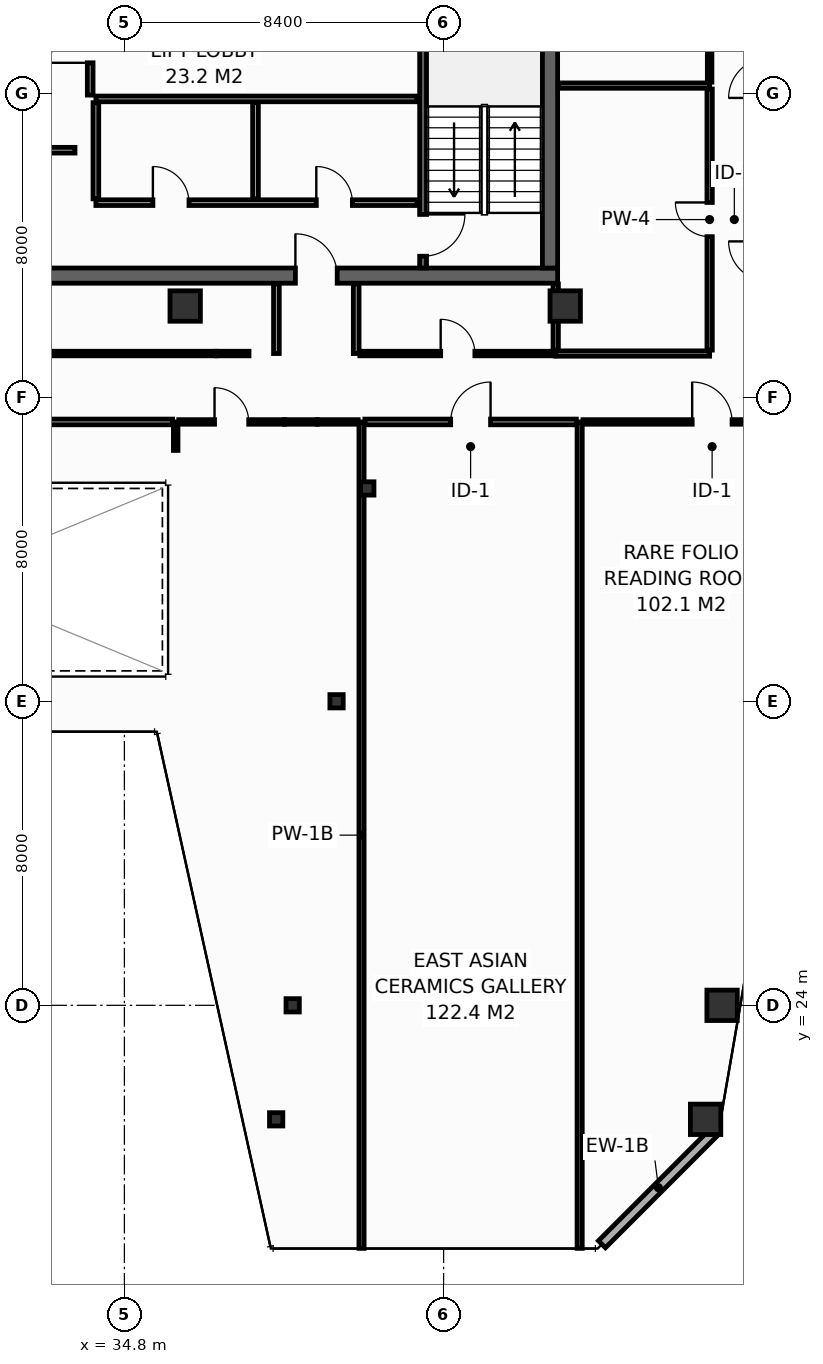
"""IFC4 building model, lengths in metres.
Left out: names, types, materials, properties, quantities, classifications, styles, units other than length and angle.
Written with IfcOpenShell. Run it as: python <this file> out.ifc"""

import sys

from ifc_helpers import new_model, si_unit, direction, frame, frame_2d, origin, origin_2d, place, context, subcontext, project, spatial, rectangle, hollow_rectangle, extrude, element, fill, save


model = new_model("IFC4")
c1 = context("Model", 3, precision=1e-05, world=origin(), true_north=direction((0.0, 1.0)))
c2 = subcontext(c1, "Body", "Model", "MODEL_VIEW")
j1 = project(units=[si_unit("LENGTHUNIT", "METRE"), si_unit("PLANEANGLEUNIT", "RADIAN")], contexts=[c1])
p1 = place(None, origin())
s1 = spatial("IfcSite", under=j1, at=p1, CompositionType="ELEMENT")
p2 = place(p1, origin())
s2 = spatial("IfcBuilding", under=s1, at=p2, CompositionType="ELEMENT")
p3 = place(p2, frame((0.0, 0.0, 249.6)))
s3 = spatial("IfcBuildingStorey", under=s2, at=p3, CompositionType="ELEMENT", Elevation=249.6)
p4 = place(p3, frame((13.7, 43.2, 0.0), z_axis=(0.0, 0.0, 1.0), x_axis=(1.0, 0.0, 0.0)))
e1 = element("IfcWall", 1, at=p4, inside=s3, PredefinedType="SHEAR", context=c2, shape_type="SweptSolid", body=[
    extrude(rectangle(XDim=32.5, YDim=0.4, at=frame_2d((16.25, 0.0))), origin(), (0.0, 0.0, 1.0), 3.35),
])
p5 = place(p4, frame((5.4, 0.0, 0.0)))
e2 = element("IfcOpeningElement", 2, at=p5, cuts=e1, PredefinedType="OPENING", context=c2, shape_type="SweptSolid", body=[
    extrude(rectangle(XDim=1.1, YDim=2.15, at=frame_2d((0.55, 1.075))), frame((0.0, 0.21, 0.0), z_axis=(0.0, -1.0, 0.0), x_axis=(1.0, 0.0, 0.0)), (0.0, 0.0, 1.0), 0.42),
])
p6 = place(p4, frame((25.6, 0.0, 0.0)))
e3 = element("IfcOpeningElement", 3, at=p6, cuts=e1, PredefinedType="OPENING", context=c2, shape_type="SweptSolid", body=[
    extrude(rectangle(XDim=1.1, YDim=2.15, at=frame_2d((0.55, 1.075))), frame((0.0, 0.21, 0.0), z_axis=(0.0, -1.0, 0.0), x_axis=(1.0, 0.0, 0.0)), (0.0, 0.0, 1.0), 0.42),
])
p7 = place(p3, frame((46.0, 43.4, 0.0), z_axis=(0.0, 0.0, 1.0), x_axis=(0.0, 1.0, 0.0)))
e4 = element("IfcWall", 4, at=p7, inside=s3, PredefinedType="SHEAR", context=c2, shape_type="SweptSolid", body=[
    extrude(rectangle(XDim=10.4, YDim=0.4, at=frame_2d((5.2, 0.0))), origin(), (0.0, 0.0, 1.0), 3.35),
])
for number, where, z_axis, x_axis in (
    (5, (36.4, 42.4, 0.0), (0.0, 0.0, 1.0), (1.0, 0.0, 0.0)),
    (6, (46.4, 42.4, 0.0), (0.0, 0.0, 1.0), (1.0, 0.0, 0.0)),
    (7, (50.094, 21.0, 0.0), (0.0, 0.0, 1.0), (1.0, 0.0, 0.0)),
):
    element("IfcColumn", number, at=place(p3, frame(where, z_axis=z_axis, x_axis=x_axis)), inside=s3, PredefinedType="COLUMN", context=c2, shape_type="SweptSolid", body=[
        extrude(hollow_rectangle(XDim=0.8, YDim=0.8, WallThickness=0.036, at=origin_2d()), origin(), (0.0, 0.0, 1.0), 3.8),
    ])
p8 = place(p3, frame((38.794, 21.0, 0.0), z_axis=(0.0, 0.0, 1.0), x_axis=(1.0, 0.0, 0.0)))
e8 = element("IfcColumn", 8, at=p8, inside=s3, PredefinedType="COLUMN", context=c2, shape_type="SweptSolid", body=[
    extrude(hollow_rectangle(XDim=0.35, YDim=0.35, WallThickness=0.016, at=origin_2d()), origin(), (0.0, 0.0, 1.0), 3.8),
])
p9 = place(p3, frame((50.528, 24.0, 0.0), z_axis=(0.0, 0.0, 1.0), x_axis=(1.0, 0.0, 0.0)))
e9 = element("IfcColumn", 9, at=p9, inside=s3, PredefinedType="COLUMN", context=c2, shape_type="SweptSolid", body=[
    extrude(hollow_rectangle(XDim=0.8, YDim=0.8, WallThickness=0.036, at=origin_2d()), origin(), (0.0, 0.0, 1.0), 3.8),
])
for number, where, z_axis, x_axis in (
    (10, (39.228, 24.0, 0.0), (0.0, 0.0, 1.0), (1.0, 0.0, 0.0)),
    (11, (40.383, 32.0, 0.0), (0.0, 0.0, 1.0), (1.0, 0.0, 0.0)),
    (12, (41.192, 37.6, 0.0), (0.0, 0.0, 1.0), (1.0, 0.0, 0.0)),
):
    element("IfcColumn", number, at=place(p3, frame(where, z_axis=z_axis, x_axis=x_axis)), inside=s3, PredefinedType="COLUMN", context=c2, shape_type="SweptSolid", body=[
        extrude(hollow_rectangle(XDim=0.35, YDim=0.35, WallThickness=0.016, at=origin_2d()), origin(), (0.0, 0.0, 1.0), 3.8),
    ])
p10 = place(p3, frame((42.66, 53.8, 0.0), z_axis=(0.0, 0.0, 1.0), x_axis=(0.0, -1.0, 0.0)))
e13 = element("IfcWall", 13, at=p10, inside=s3, PredefinedType="SHEAR", context=c2, shape_type="SweptSolid", body=[
    extrude(rectangle(XDim=10.4, YDim=0.18, at=frame_2d((5.2, 0.0))), origin(), (0.0, 0.0, 1.0), 3.35),
])
p11 = place(p10, frame((8.99, 0.0, 0.0)))
e14 = element("IfcOpeningElement", 14, at=p11, cuts=e13, PredefinedType="OPENING", context=c2, shape_type="SweptSolid", body=[
    extrude(rectangle(XDim=1.1, YDim=2.15, at=frame_2d((0.55, 1.075))), frame((0.0, 0.1, 0.0), z_axis=(0.0, -1.0, 0.0), x_axis=(1.0, 0.0, 0.0)), (0.0, 0.0, 1.0), 0.2),
])
p12 = place(p3, frame((33.9, 47.95, 0.0), z_axis=(0.0, 0.0, 1.0), x_axis=(0.0, 1.0, 0.0)))
e15 = element("IfcWall", 15, at=p12, inside=s3, PredefinedType="PARTITIONING", context=c2, shape_type="SweptSolid", body=[
    extrude(rectangle(XDim=2.75, YDim=0.15, at=frame_2d((1.375, 0.0))), origin(), (0.0, 0.0, 1.0), 3.35),
])
p13 = place(p12, frame((0.85, 0.0, 0.0)))
e16 = element("IfcOpeningElement", 16, at=p13, cuts=e15, PredefinedType="OPENING", context=c2, shape_type="SweptSolid", body=[
    extrude(rectangle(XDim=1.05, YDim=2.15, at=frame_2d((0.525, 1.075))), frame((0.0, 0.085, 0.0), z_axis=(0.0, -1.0, 0.0), x_axis=(1.0, 0.0, 0.0)), (0.0, 0.0, 1.0), 0.17),
])
p14 = place(p3, frame((34.05, 45.12, 0.0), z_axis=(0.0, 0.0, 1.0), x_axis=(1.0, 0.0, 0.0)))
e17 = element("IfcWall", 17, at=p14, inside=s3, PredefinedType="PARTITIONING", context=c2, shape_type="SweptSolid", body=[
    extrude(rectangle(XDim=8.45, YDim=0.15, at=frame_2d((4.225, 0.0))), origin(), (0.0, 0.0, 1.0), 3.35),
])
p15 = place(p14, frame((1.5, 0.0, 0.0)))
e18 = element("IfcOpeningElement", 18, at=p15, cuts=e17, PredefinedType="OPENING", context=c2, shape_type="SweptSolid", body=[
    extrude(rectangle(XDim=0.95, YDim=2.15, at=frame_2d((0.475, 1.075))), frame((0.0, 0.085, 0.0), z_axis=(0.0, -1.0, 0.0), x_axis=(1.0, 0.0, 0.0)), (0.0, 0.0, 1.0), 0.17),
])
p16 = place(p14, frame((5.8, 0.0, 0.0)))
e19 = element("IfcOpeningElement", 19, at=p16, cuts=e17, PredefinedType="OPENING", context=c2, shape_type="SweptSolid", body=[
    extrude(rectangle(XDim=0.95, YDim=2.15, at=frame_2d((0.475, 1.075))), frame((0.0, 0.085, 0.0), z_axis=(0.0, -1.0, 0.0), x_axis=(1.0, 0.0, 0.0)), (0.0, 0.0, 1.0), 0.17),
])
p17 = place(p3, frame((34.05, 47.85, 0.0), z_axis=(0.0, 0.0, 1.0), x_axis=(1.0, 0.0, 0.0)))
e20 = element("IfcWall", 20, at=p17, inside=s3, PredefinedType="PARTITIONING", context=c2, shape_type="SweptSolid", body=[
    extrude(rectangle(XDim=8.45, YDim=0.15, at=frame_2d((4.225, 0.0))), origin(), (0.0, 0.0, 1.0), 3.35),
])
for number, where, z_axis, x_axis in (
    (21, (38.25, 45.22, 0.0), (0.0, 0.0, 1.0), (0.0, 1.0, 0.0)),
    (22, (34.05, 45.22, 0.0), (0.0, 0.0, 1.0), (0.0, 1.0, 0.0)),
):
    element("IfcWall", number, at=place(p3, frame(where, z_axis=z_axis, x_axis=x_axis)), inside=s3, PredefinedType="PARTITIONING", context=c2, shape_type="SweptSolid", body=[
        extrude(rectangle(XDim=2.53, YDim=0.15, at=frame_2d((1.265, 0.0))), origin(), (0.0, 0.0, 1.0), 3.35),
    ])
p18 = place(p3, frame((25.85, 46.5, 0.0), z_axis=(0.0, 0.0, 1.0), x_axis=(1.0, 0.0, 0.0)))
e23 = element("IfcWall", 23, at=p18, inside=s3, PredefinedType="PARTITIONING", context=c2, shape_type="SweptSolid", body=[
    extrude(rectangle(XDim=7.65, YDim=0.15, at=frame_2d((3.825, 0.0))), origin(), (0.0, 0.0, 1.0), 3.35),
])
p19 = place(p18, frame((2.8, 0.0, 0.0)))
e24 = element("IfcOpeningElement", 24, at=p19, cuts=e23, PredefinedType="OPENING", context=c2, shape_type="SweptSolid", body=[
    extrude(rectangle(XDim=0.95, YDim=2.15, at=frame_2d((0.475, 1.075))), frame((0.0, 0.085, 0.0), z_axis=(0.0, -1.0, 0.0), x_axis=(1.0, 0.0, 0.0)), (0.0, 0.0, 1.0), 0.17),
])
p20 = place(p3, frame((47.366, 17.713, 0.0), z_axis=(0.0, 0.0, 1.0), x_axis=(0.70707775441, 0.707135806771, 0.0)))
e25 = element("IfcWall", 25, at=p20, inside=s3, PredefinedType="STANDARD", context=c2, shape_type="SweptSolid", body=[
    extrude(rectangle(XDim=4.206, YDim=0.26, at=frame_2d((2.103, 0.0))), origin(), (0.0, 0.0, 1.0), 3.35),
])
p21 = place(p3, frame((46.15, 41.15, 0.0), z_axis=(0.0, 0.0, 1.0), x_axis=(1.0, 0.0, 0.0)))
e26 = element("IfcWall", 26, at=p21, inside=s3, PredefinedType="PARTITIONING", context=c2, shape_type="SweptSolid", body=[
    extrude(rectangle(XDim=4.05, YDim=0.14, at=frame_2d((2.025, 0.0))), origin(), (0.0, 0.0, 1.0), 3.35),
])
p22 = place(p3, frame((46.15, 41.24, 0.0), z_axis=(0.0, 0.0, 1.0), x_axis=(0.0, 1.0, 0.0)))
e27 = element("IfcWall", 27, at=p22, inside=s3, PredefinedType="PARTITIONING", context=c2, shape_type="SweptSolid", body=[
    extrude(rectangle(XDim=1.74, YDim=0.14, at=frame_2d((0.87, 0.0))), origin(), (0.0, 0.0, 1.0), 3.35),
])
p23 = place(p3, frame((46.22, 48.2, 0.0), z_axis=(0.0, 0.0, 1.0), x_axis=(1.0, 0.0, 0.0)))
e28 = element("IfcWall", 28, at=p23, inside=s3, PredefinedType="PARTITIONING", context=c2, shape_type="SweptSolid", body=[
    extrude(rectangle(XDim=3.98, YDim=0.14, at=frame_2d((1.99, 0.0))), origin(), (0.0, 0.0, 1.0), 3.35),
])
p24 = place(p3, frame((50.2, 41.24, 0.0), z_axis=(0.0, 0.0, 1.0), x_axis=(0.0, 1.0, 0.0)))
e29 = element("IfcWall", 29, at=p24, inside=s3, PredefinedType="PARTITIONING", context=c2, shape_type="SweptSolid", body=[
    extrude(rectangle(XDim=6.87, YDim=0.14, at=frame_2d((3.435, 0.0))), origin(), (0.0, 0.0, 1.0), 2.747),
])
p25 = place(p24, frame((2.985, 0.0, 0.0)))
e30 = element("IfcOpeningElement", 30, at=p25, cuts=e29, PredefinedType="OPENING", context=c2, shape_type="SweptSolid", body=[
    extrude(rectangle(XDim=0.9, YDim=2.1, at=frame_2d((0.45, 1.05))), frame((0.0, 0.08, 0.0), z_axis=(0.0, -1.0, 0.0), x_axis=(1.0, 0.0, 0.0)), (0.0, 0.0, 1.0), 0.16),
])
p26 = place(p3, frame((50.2, 48.29, 0.0), z_axis=(0.0, 0.0, 1.0), x_axis=(0.0, 1.0, 0.0)))
e31 = element("IfcWall", 31, at=p26, inside=s3, PredefinedType="PARTITIONING", context=c2, shape_type="SweptSolid", body=[
    extrude(rectangle(XDim=3.98, YDim=0.12, at=frame_2d((1.99, 0.0))), origin(), (0.0, 0.0, 1.0), 3.35),
])
p27 = place(p26, frame((1.54, 0.0, 0.0)))
e32 = element("IfcOpeningElement", 32, at=p27, cuts=e31, PredefinedType="OPENING", context=c2, shape_type="SweptSolid", body=[
    extrude(rectangle(XDim=0.9, YDim=2.1, at=frame_2d((0.45, 1.05))), frame((0.0, 0.07, 0.0), z_axis=(0.0, -1.0, 0.0), x_axis=(1.0, 0.0, 0.0)), (0.0, 0.0, 1.0), 0.14),
])
for number, where, z_axis, x_axis in (
    (33, (38.8, 41.15, 0.0), (0.0, 0.0, 1.0), (0.0, 1.0, 0.0)),
    (34, (40.9, 41.15, 0.0), (0.0, 0.0, 1.0), (0.0, 1.0, 0.0)),
):
    element("IfcWall", number, at=place(p3, frame(where, z_axis=z_axis, x_axis=x_axis)), inside=s3, PredefinedType="PARTITIONING", context=c2, shape_type="SweptSolid", body=[
        extrude(rectangle(XDim=1.83, YDim=0.15, at=frame_2d((0.915, 0.0))), origin(), (0.0, 0.0, 1.0), 3.35),
    ])
p28 = place(p3, frame((22.783, 41.15, 0.0), z_axis=(0.0, 0.0, 1.0), x_axis=(1.0, 0.0, 0.0)))
e35 = element("IfcWall", 35, at=p28, inside=s3, PredefinedType="PARTITIONING", context=c2, shape_type="SweptSolid", body=[
    extrude(rectangle(XDim=14.434, YDim=0.12, at=frame_2d((7.217, 0.0))), origin(), (0.0, 0.0, 1.0), 3.35),
])
p29 = place(p28, frame((6.767, 0.0, 0.0)))
e36 = element("IfcOpeningElement", 36, at=p29, cuts=e35, PredefinedType="OPENING", context=c2, shape_type="SweptSolid", body=[
    extrude(rectangle(XDim=0.9, YDim=2.1, at=frame_2d((0.45, 1.05))), frame((0.0, 0.07, 0.0), z_axis=(0.0, -1.0, 0.0), x_axis=(1.0, 0.0, 0.0)), (0.0, 0.0, 1.0), 0.14),
])
p30 = place(p3, frame((37.217, 41.15, 0.0), z_axis=(0.0, 0.0, 1.0), x_axis=(1.0, 0.0, 0.0)))
e37 = element("IfcWall", 37, at=p30, inside=s3, PredefinedType="PARTITIONING", context=c2, shape_type="SweptSolid", body=[
    extrude(rectangle(XDim=0.862, YDim=0.12, at=frame_2d((0.431, 0.0))), origin(), (0.0, 0.0, 1.0), 1.935),
])
p31 = place(p3, frame((40.995, 41.15, 0.0), z_axis=(0.0, 0.0, 1.0), x_axis=(1.0, 0.0, 0.0)))
e38 = element("IfcWall", 38, at=p31, inside=s3, PredefinedType="PARTITIONING", context=c2, shape_type="SweptSolid", body=[
    extrude(rectangle(XDim=5.155, YDim=0.12, at=frame_2d((2.577, 0.0))), origin(), (0.0, 0.0, 1.0), 3.35),
])
p32 = place(p31, frame((2.128, 0.0, 0.0)))
e39 = element("IfcOpeningElement", 39, at=p32, cuts=e38, PredefinedType="OPENING", context=c2, shape_type="SweptSolid", body=[
    extrude(rectangle(XDim=0.9, YDim=2.1, at=frame_2d((0.45, 1.05))), frame((0.0, 0.07, 0.0), z_axis=(0.0, -1.0, 0.0), x_axis=(1.0, 0.0, 0.0)), (0.0, 0.0, 1.0), 0.14),
])
for number, where, z_axis, x_axis in (
    (40, (41.04, 17.605, 0.0), (0.0, 0.0, 1.0), (0.0, 1.0, 0.0)),
    (41, (46.78, 17.605, 0.0), (0.0, 0.0, 1.0), (0.0, 1.0, 0.0)),
):
    element("IfcWall", number, at=place(p3, frame(where, z_axis=z_axis, x_axis=x_axis)), inside=s3, PredefinedType="PARTITIONING", context=c2, shape_type="SweptSolid", body=[
        extrude(rectangle(XDim=21.745, YDim=0.135, at=frame_2d((10.873, 0.0))), origin(), (0.0, 0.0, 1.0), 1.535),
    ])
p33 = place(p3, frame((36.15, 38.6, 0.0), z_axis=(0.0, 0.0, 1.0), x_axis=(0.0, 1.0, 0.0)))
e42 = element("IfcWall", 42, at=p33, inside=s3, PredefinedType="PARTITIONING", context=c2, shape_type="SweptSolid", body=[
    extrude(rectangle(XDim=0.75, YDim=0.12, at=frame_2d((0.375, 0.0))), origin(), (0.0, 0.0, 1.0), 3.35),
])
p34 = place(p3, frame((23.93, 39.35, 0.0), z_axis=(0.0, 0.0, 1.0), x_axis=(1.0, 0.0, 0.0)))
e43 = element("IfcWall", 43, at=p34, inside=s3, PredefinedType="PARTITIONING", context=c2, shape_type="SweptSolid", body=[
    extrude(rectangle(XDim=12.14, YDim=0.15, at=frame_2d((6.07, 0.0))), origin(), (0.0, 0.0, 1.0), 3.35),
])
p35 = place(p3, frame((36.23, 39.35, 0.0), z_axis=(0.0, 0.0, 1.0), x_axis=(1.0, 0.0, 0.0)))
e44 = element("IfcWall", 44, at=p35, inside=s3, PredefinedType="PARTITIONING", context=c2, shape_type="SweptSolid", body=[
    extrude(rectangle(XDim=2.784, YDim=0.12, at=frame_2d((1.392, 0.0))), origin(), (0.0, 0.0, 1.0), 3.35),
])
p36 = place(p35, frame((0.942, 0.0, 0.0)))
e45 = element("IfcOpeningElement", 45, at=p36, cuts=e44, PredefinedType="OPENING", context=c2, shape_type="SweptSolid", body=[
    extrude(rectangle(XDim=0.9, YDim=2.1, at=frame_2d((0.45, 1.05))), frame((0.0, 0.07, 0.0), z_axis=(0.0, -1.0, 0.0), x_axis=(1.0, 0.0, 0.0)), (0.0, 0.0, 1.0), 0.14),
])
p37 = place(p3, frame((39.876, 39.35, 0.0), z_axis=(0.0, 0.0, 1.0), x_axis=(1.0, 0.0, 0.0)))
e46 = element("IfcWall", 46, at=p37, inside=s3, PredefinedType="PARTITIONING", context=c2, shape_type="SweptSolid", body=[
    extrude(rectangle(XDim=1.076, YDim=0.12, at=frame_2d((0.538, 0.0))), origin(), (0.0, 0.0, 1.0), 3.35),
])
p38 = place(p3, frame((39.014, 39.35, 0.0), z_axis=(0.0, 0.0, 1.0), x_axis=(1.0, 0.0, 0.0)))
e47 = element("IfcWall", 47, at=p38, inside=s3, PredefinedType="PARTITIONING", context=c2, shape_type="SweptSolid", body=[
    extrude(rectangle(XDim=0.862, YDim=0.12, at=frame_2d((0.431, 0.0))), origin(), (0.0, 0.0, 1.0), 1.935),
])
p39 = place(p3, frame((41.127, 39.35, 0.0), z_axis=(0.0, 0.0, 1.0), x_axis=(1.0, 0.0, 0.0)))
e48 = element("IfcWall", 48, at=p39, inside=s3, PredefinedType="PARTITIONING", context=c2, shape_type="SweptSolid", body=[
    extrude(rectangle(XDim=5.565, YDim=0.15, at=frame_2d((2.782, 0.0))), origin(), (0.0, 0.0, 1.0), 3.35),
])
p40 = place(p39, frame((2.258, 0.0, 0.0)))
e49 = element("IfcOpeningElement", 49, at=p40, cuts=e48, PredefinedType="OPENING", context=c2, shape_type="SweptSolid", body=[
    extrude(rectangle(XDim=1.05, YDim=2.15, at=frame_2d((0.525, 1.075))), frame((0.0, 0.085, 0.0), z_axis=(0.0, -1.0, 0.0), x_axis=(1.0, 0.0, 0.0)), (0.0, 0.0, 1.0), 0.17),
])
p41 = place(p3, frame((46.867, 39.35, 0.0), z_axis=(0.0, 0.0, 1.0), x_axis=(1.0, 0.0, 0.0)))
e50 = element("IfcWall", 50, at=p41, inside=s3, PredefinedType="PARTITIONING", context=c2, shape_type="SweptSolid", body=[
    extrude(rectangle(XDim=6.796, YDim=0.12, at=frame_2d((3.398, 0.0))), origin(), (0.0, 0.0, 1.0), 2.885),
])
p42 = place(p41, frame((2.873, 0.0, 0.0)))
e51 = element("IfcOpeningElement", 51, at=p42, cuts=e50, PredefinedType="OPENING", context=c2, shape_type="SweptSolid", body=[
    extrude(rectangle(XDim=1.05, YDim=2.15, at=frame_2d((0.525, 1.075))), frame((0.0, 0.07, 0.0), z_axis=(0.0, -1.0, 0.0), x_axis=(1.0, 0.0, 0.0)), (0.0, 0.0, 1.0), 0.14),
])
p43 = place(p11, origin())
e52 = element("IfcDoor", 52, at=p43, inside=s3, OperationType="SINGLE_SWING_LEFT", PredefinedType="DOOR", context=c2, shape_type="SweptSolid", body=[
    extrude(rectangle(XDim=1.1, YDim=2.15, at=frame_2d((0.55, 1.075))), frame((0.0, 0.025, 0.0), z_axis=(0.0, -1.0, 0.0), x_axis=(1.0, 0.0, 0.0)), (0.0, 0.0, 1.0), 0.05),
])
fill(e14, e52)
p44 = place(p6, origin())
e53 = element("IfcDoor", 53, at=p44, inside=s3, OperationType="SINGLE_SWING_LEFT", PredefinedType="DOOR", context=c2, shape_type="SweptSolid", body=[
    extrude(rectangle(XDim=1.1, YDim=2.15, at=frame_2d((0.55, 1.075))), frame((0.0, 0.025, 0.0), z_axis=(0.0, -1.0, 0.0), x_axis=(1.0, 0.0, 0.0)), (0.0, 0.0, 1.0), 0.05),
])
fill(e3, e53)
p45 = place(p13, origin())
e54 = element("IfcDoor", 54, at=p45, inside=s3, OperationType="SINGLE_SWING_LEFT", PredefinedType="DOOR", context=c2, shape_type="SweptSolid", body=[
    extrude(rectangle(XDim=1.05, YDim=2.15, at=frame_2d((0.525, 1.075))), frame((0.0, 0.025, 0.0), z_axis=(0.0, -1.0, 0.0), x_axis=(1.0, 0.0, 0.0)), (0.0, 0.0, 1.0), 0.05),
])
fill(e16, e54)
p46 = place(p15, origin())
e55 = element("IfcDoor", 55, at=p46, inside=s3, OperationType="SINGLE_SWING_LEFT", PredefinedType="DOOR", context=c2, shape_type="SweptSolid", body=[
    extrude(rectangle(XDim=0.95, YDim=2.15, at=frame_2d((0.475, 1.075))), frame((0.0, 0.025, 0.0), z_axis=(0.0, -1.0, 0.0), x_axis=(1.0, 0.0, 0.0)), (0.0, 0.0, 1.0), 0.05),
])
fill(e18, e55)
p47 = place(p16, origin())
e56 = element("IfcDoor", 56, at=p47, inside=s3, OperationType="SINGLE_SWING_LEFT", PredefinedType="DOOR", context=c2, shape_type="SweptSolid", body=[
    extrude(rectangle(XDim=0.95, YDim=2.15, at=frame_2d((0.475, 1.075))), frame((0.0, 0.025, 0.0), z_axis=(0.0, -1.0, 0.0), x_axis=(1.0, 0.0, 0.0)), (0.0, 0.0, 1.0), 0.05),
])
fill(e19, e56)
p48 = place(p25, origin())
e57 = element("IfcDoor", 57, at=p48, inside=s3, OperationType="SINGLE_SWING_RIGHT", PredefinedType="DOOR", context=c2, shape_type="SweptSolid", body=[
    extrude(rectangle(XDim=0.9, YDim=2.1, at=frame_2d((0.45, 1.05))), frame((0.0, 0.025, 0.0), z_axis=(0.0, -1.0, 0.0), x_axis=(1.0, 0.0, 0.0)), (0.0, 0.0, 1.0), 0.05),
])
fill(e30, e57)
p49 = place(p32, origin())
e58 = element("IfcDoor", 58, at=p49, inside=s3, OperationType="SINGLE_SWING_LEFT", PredefinedType="DOOR", context=c2, shape_type="SweptSolid", body=[
    extrude(rectangle(XDim=0.9, YDim=2.1, at=frame_2d((0.45, 1.05))), frame((0.0, 0.025, 0.0), z_axis=(0.0, -1.0, 0.0), x_axis=(1.0, 0.0, 0.0)), (0.0, 0.0, 1.0), 0.05),
])
fill(e39, e58)
p50 = place(p36, origin())
e59 = element("IfcDoor", 59, at=p50, inside=s3, OperationType="SINGLE_SWING_LEFT", PredefinedType="DOOR", context=c2, shape_type="SweptSolid", body=[
    extrude(rectangle(XDim=0.9, YDim=2.1, at=frame_2d((0.45, 1.05))), frame((0.0, 0.025, 0.0), z_axis=(0.0, -1.0, 0.0), x_axis=(1.0, 0.0, 0.0)), (0.0, 0.0, 1.0), 0.05),
])
fill(e45, e59)
p51 = place(p40, origin())
e60 = element("IfcDoor", 60, at=p51, inside=s3, OperationType="SINGLE_SWING_RIGHT", PredefinedType="DOOR", context=c2, shape_type="SweptSolid", body=[
    extrude(rectangle(XDim=1.05, YDim=2.15, at=frame_2d((0.525, 1.075))), frame((0.0, 0.025, 0.0), z_axis=(0.0, -1.0, 0.0), x_axis=(1.0, 0.0, 0.0)), (0.0, 0.0, 1.0), 0.05),
])
fill(e49, e60)
p52 = place(p42, origin())
e61 = element("IfcDoor", 61, at=p52, inside=s3, OperationType="SINGLE_SWING_LEFT", PredefinedType="DOOR", context=c2, shape_type="SweptSolid", body=[
    extrude(rectangle(XDim=1.05, YDim=2.15, at=frame_2d((0.525, 1.075))), frame((0.0, 0.025, 0.0), z_axis=(0.0, -1.0, 0.0), x_axis=(1.0, 0.0, 0.0)), (0.0, 0.0, 1.0), 0.05),
])
fill(e51, e61)
save(model, sys.argv[1])
